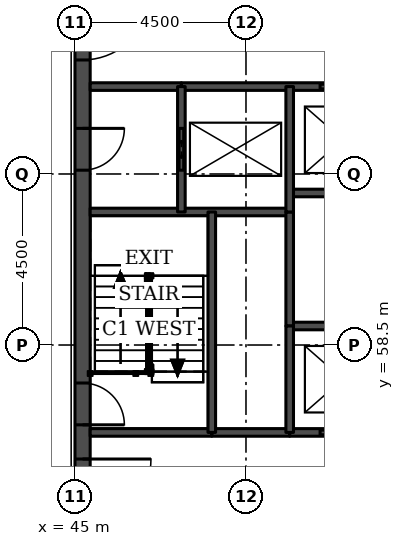
"""IFC4 building model, lengths in metres.
Left out: names, types, materials, properties, quantities, classifications, styles, units other than length and angle.
Written with IfcOpenShell. Run it as: python <this file> out.ifc"""

import sys

from ifc_helpers import new_model, si_unit, direction, frame, frame_2d, origin, place, context, subcontext, project, spatial, rectangle, extrude, element, fill, save


model = new_model("IFC4")
c1 = context("Model", 3, precision=1e-05, world=origin(), true_north=direction((0.0, 1.0)))
c2 = subcontext(c1, "Body", "Model", "MODEL_VIEW")
j1 = project(units=[si_unit("LENGTHUNIT", "METRE"), si_unit("PLANEANGLEUNIT", "RADIAN")], contexts=[c1])
p1 = place(None, origin())
s1 = spatial("IfcSite", under=j1, at=p1, CompositionType="ELEMENT")
p2 = place(p1, origin())
s2 = spatial("IfcBuilding", under=s1, at=p2, CompositionType="ELEMENT")
p3 = place(p2, frame((0.0, 0.0, 206.9)))
s3 = spatial("IfcBuildingStorey", under=s2, at=p3, CompositionType="ELEMENT", Elevation=206.9)
p4 = place(p3, frame((45.2, 49.5, 0.0), z_axis=(0.0, 0.0, 1.0), x_axis=(0.0, 1.0, 0.0)))
e1 = element("IfcWall", 1, at=p4, inside=s3, PredefinedType="SHEAR", context=c2, shape_type="SweptSolid", body=[
    extrude(rectangle(XDim=22.5, YDim=0.4, at=frame_2d((11.25, 0.0))), origin(), (0.0, 0.0, 1.0), 5.0),
])
p5 = place(p4, frame((4.2, 0.0, 0.0)))
e2 = element("IfcOpeningElement", 2, at=p5, cuts=e1, PredefinedType="OPENING", context=c2, shape_type="SweptSolid", body=[
    extrude(rectangle(XDim=1.8, YDim=2.1, at=frame_2d((0.9, 1.05))), frame((0.0, 0.21, 0.0), z_axis=(0.0, -1.0, 0.0), x_axis=(1.0, 0.0, 0.0)), (0.0, 0.0, 1.0), 0.42),
])
p6 = place(p4, frame((6.9, 0.0, 0.0)))
e3 = element("IfcOpeningElement", 3, at=p6, cuts=e1, PredefinedType="OPENING", context=c2, shape_type="SweptSolid", body=[
    extrude(rectangle(XDim=1.1, YDim=2.1, at=frame_2d((0.55, 1.05))), frame((0.0, 0.21, 0.0), z_axis=(0.0, -1.0, 0.0), x_axis=(1.0, 0.0, 0.0)), (0.0, 0.0, 1.0), 0.42),
])
p7 = place(p4, frame((13.6, 0.0, 0.0)))
e4 = element("IfcOpeningElement", 4, at=p7, cuts=e1, PredefinedType="OPENING", context=c2, shape_type="SweptSolid", body=[
    extrude(rectangle(XDim=1.1, YDim=2.1, at=frame_2d((0.55, 1.05))), frame((0.0, 0.21, 0.0), z_axis=(0.0, -1.0, 0.0), x_axis=(1.0, 0.0, 0.0)), (0.0, 0.0, 1.0), 0.42),
])
p8 = place(p4, frame((16.5, 0.0, 0.0)))
e5 = element("IfcOpeningElement", 5, at=p8, cuts=e1, PredefinedType="OPENING", context=c2, shape_type="SweptSolid", body=[
    extrude(rectangle(XDim=1.8, YDim=2.1, at=frame_2d((0.9, 1.05))), frame((0.0, 0.21, 0.0), z_axis=(0.0, -1.0, 0.0), x_axis=(1.0, 0.0, 0.0)), (0.0, 0.0, 1.0), 0.42),
])
p9 = place(p3, frame((48.6, 56.2, 0.0), z_axis=(0.0, 0.0, 1.0), x_axis=(1.0, 0.0, 0.0)))
e6 = element("IfcWall", 6, at=p9, inside=s3, PredefinedType="SOLIDWALL", context=c2, shape_type="SweptSolid", body=[
    extrude(rectangle(XDim=2.05, YDim=0.2, at=frame_2d((1.025, 0.0))), origin(), (0.0, 0.0, 1.0), 4.85),
])
p10 = place(p3, frame((45.4, 56.2, 0.0), z_axis=(0.0, 0.0, 1.0), x_axis=(1.0, 0.0, 0.0)))
e7 = element("IfcWall", 7, at=p10, inside=s3, PredefinedType="SOLIDWALL", context=c2, shape_type="SweptSolid", body=[
    extrude(rectangle(XDim=3.2, YDim=0.2, at=frame_2d((1.6, 0.0))), origin(), (0.0, 0.0, 1.0), 4.85),
])
p11 = place(p3, frame((50.65, 56.2, 0.0), z_axis=(0.0, 0.0, 1.0), x_axis=(1.0, 0.0, 0.0)))
e8 = element("IfcWall", 8, at=p11, inside=s3, PredefinedType="SOLIDWALL", context=c2, shape_type="SweptSolid", body=[
    extrude(rectangle(XDim=11.2, YDim=0.2, at=frame_2d((5.6, 0.0))), origin(), (0.0, 0.0, 1.0), 4.85),
])
p12 = place(p11, frame((0.8, 0.0, 0.0)))
e9 = element("IfcOpeningElement", 9, at=p12, cuts=e8, PredefinedType="OPENING", context=c2, shape_type="SweptSolid", body=[
    extrude(rectangle(XDim=1.2, YDim=2.1, at=frame_2d((0.6, 1.05))), frame((0.0, 0.11, 0.0), z_axis=(0.0, -1.0, 0.0), x_axis=(1.0, 0.0, 0.0)), (0.0, 0.0, 1.0), 0.22),
])
p13 = place(p11, frame((3.6, 0.0, 0.0)))
e10 = element("IfcOpeningElement", 10, at=p13, cuts=e8, PredefinedType="OPENING", context=c2, shape_type="SweptSolid", body=[
    extrude(rectangle(XDim=1.2, YDim=2.1, at=frame_2d((0.6, 1.05))), frame((0.0, 0.11, 0.0), z_axis=(0.0, -1.0, 0.0), x_axis=(1.0, 0.0, 0.0)), (0.0, 0.0, 1.0), 0.22),
])
p14 = place(p11, frame((6.4, 0.0, 0.0)))
e11 = element("IfcOpeningElement", 11, at=p14, cuts=e8, PredefinedType="OPENING", context=c2, shape_type="SweptSolid", body=[
    extrude(rectangle(XDim=1.2, YDim=2.1, at=frame_2d((0.6, 1.05))), frame((0.0, 0.11, 0.0), z_axis=(0.0, -1.0, 0.0), x_axis=(1.0, 0.0, 0.0)), (0.0, 0.0, 1.0), 0.22),
])
p15 = place(p11, frame((9.2, 0.0, 0.0)))
e12 = element("IfcOpeningElement", 12, at=p15, cuts=e8, PredefinedType="OPENING", context=c2, shape_type="SweptSolid", body=[
    extrude(rectangle(XDim=1.2, YDim=2.1, at=frame_2d((0.6, 1.05))), frame((0.0, 0.11, 0.0), z_axis=(0.0, -1.0, 0.0), x_axis=(1.0, 0.0, 0.0)), (0.0, 0.0, 1.0), 0.22),
])
p16 = place(p3, frame((50.65, 59.0, 0.0), z_axis=(0.0, 0.0, 1.0), x_axis=(1.0, 0.0, 0.0)))
e13 = element("IfcWall", 13, at=p16, inside=s3, PredefinedType="SOLIDWALL", context=c2, shape_type="SweptSolid", body=[
    extrude(rectangle(XDim=11.2, YDim=0.2, at=frame_2d((5.6, 0.0))), origin(), (0.0, 0.0, 1.0), 5.0),
])
p17 = place(p3, frame((45.4, 62.0, 0.0), z_axis=(0.0, 0.0, 1.0), x_axis=(1.0, 0.0, 0.0)))
e14 = element("IfcWall", 14, at=p17, inside=s3, PredefinedType="SOLIDWALL", context=c2, shape_type="SweptSolid", body=[
    extrude(rectangle(XDim=5.25, YDim=0.2, at=frame_2d((2.625, 0.0))), origin(), (0.0, 0.0, 1.0), 4.85),
])
p18 = place(p3, frame((50.65, 62.5, 0.0), z_axis=(0.0, 0.0, 1.0), x_axis=(1.0, 0.0, 0.0)))
e15 = element("IfcWall", 15, at=p18, inside=s3, PredefinedType="SOLIDWALL", context=c2, shape_type="SweptSolid", body=[
    extrude(rectangle(XDim=11.2, YDim=0.2, at=frame_2d((5.6, 0.0))), origin(), (0.0, 0.0, 1.0), 5.0),
])
p19 = place(p3, frame((45.4, 65.3, 0.0), z_axis=(0.0, 0.0, 1.0), x_axis=(1.0, 0.0, 0.0)))
e16 = element("IfcWall", 16, at=p19, inside=s3, PredefinedType="SOLIDWALL", context=c2, shape_type="SweptSolid", body=[
    extrude(rectangle(XDim=2.4, YDim=0.2, at=frame_2d((1.2, 0.0))), origin(), (0.0, 0.0, 1.0), 4.85),
])
p20 = place(p3, frame((47.8, 65.3, 0.0), z_axis=(0.0, 0.0, 1.0), x_axis=(1.0, 0.0, 0.0)))
e17 = element("IfcWall", 17, at=p20, inside=s3, PredefinedType="SOLIDWALL", context=c2, shape_type="SweptSolid", body=[
    extrude(rectangle(XDim=16.9, YDim=0.2, at=frame_2d((8.45, 0.0))), origin(), (0.0, 0.0, 1.0), 4.85),
])
p21 = place(p20, frame((3.65, 0.0, 0.0)))
e18 = element("IfcOpeningElement", 18, at=p21, cuts=e17, PredefinedType="OPENING", context=c2, shape_type="SweptSolid", body=[
    extrude(rectangle(XDim=1.2, YDim=2.1, at=frame_2d((0.6, 1.05))), frame((0.0, 0.11, 0.0), z_axis=(0.0, -1.0, 0.0), x_axis=(1.0, 0.0, 0.0)), (0.0, 0.0, 1.0), 0.22),
])
p22 = place(p20, frame((6.45, 0.0, 0.0)))
e19 = element("IfcOpeningElement", 19, at=p22, cuts=e17, PredefinedType="OPENING", context=c2, shape_type="SweptSolid", body=[
    extrude(rectangle(XDim=1.2, YDim=2.1, at=frame_2d((0.6, 1.05))), frame((0.0, 0.11, 0.0), z_axis=(0.0, -1.0, 0.0), x_axis=(1.0, 0.0, 0.0)), (0.0, 0.0, 1.0), 0.22),
])
p23 = place(p20, frame((9.25, 0.0, 0.0)))
e20 = element("IfcOpeningElement", 20, at=p23, cuts=e17, PredefinedType="OPENING", context=c2, shape_type="SweptSolid", body=[
    extrude(rectangle(XDim=1.2, YDim=2.1, at=frame_2d((0.6, 1.05))), frame((0.0, 0.11, 0.0), z_axis=(0.0, -1.0, 0.0), x_axis=(1.0, 0.0, 0.0)), (0.0, 0.0, 1.0), 0.22),
])
p24 = place(p20, frame((12.05, 0.0, 0.0)))
e21 = element("IfcOpeningElement", 21, at=p24, cuts=e17, PredefinedType="OPENING", context=c2, shape_type="SweptSolid", body=[
    extrude(rectangle(XDim=1.2, YDim=2.1, at=frame_2d((0.6, 1.05))), frame((0.0, 0.11, 0.0), z_axis=(0.0, -1.0, 0.0), x_axis=(1.0, 0.0, 0.0)), (0.0, 0.0, 1.0), 0.22),
])
p25 = place(p3, frame((47.8, 62.0, 0.0), z_axis=(0.0, 0.0, 1.0), x_axis=(0.0, 1.0, 0.0)))
e22 = element("IfcWall", 22, at=p25, inside=s3, PredefinedType="SOLIDWALL", context=c2, shape_type="SweptSolid", body=[
    extrude(rectangle(XDim=3.3, YDim=0.2, at=frame_2d((1.65, 0.0))), origin(), (0.0, 0.0, 1.0), 4.85),
])
p26 = place(p25, frame((1.1, 0.0, 0.0)))
e23 = element("IfcOpeningElement", 23, at=p26, cuts=e22, PredefinedType="OPENING", context=c2, shape_type="SweptSolid", body=[
    extrude(rectangle(XDim=1.1, YDim=2.1, at=frame_2d((0.55, 1.05))), frame((0.0, 0.11, 0.0), z_axis=(0.0, -1.0, 0.0), x_axis=(1.0, 0.0, 0.0)), (0.0, 0.0, 1.0), 0.22),
])
p27 = place(p3, frame((48.6, 56.2, 0.0), z_axis=(0.0, 0.0, 1.0), x_axis=(0.0, 1.0, 0.0)))
e24 = element("IfcWall", 24, at=p27, inside=s3, PredefinedType="SOLIDWALL", context=c2, shape_type="SweptSolid", body=[
    extrude(rectangle(XDim=5.8, YDim=0.2, at=frame_2d((2.9, 0.0))), origin(), (0.0, 0.0, 1.0), 4.85),
])
p28 = place(p3, frame((50.65, 59.0, 0.0), z_axis=(0.0, 0.0, 1.0), x_axis=(0.0, 1.0, 0.0)))
e25 = element("IfcWall", 25, at=p28, inside=s3, PredefinedType="SOLIDWALL", context=c2, shape_type="SweptSolid", body=[
    extrude(rectangle(XDim=3.0, YDim=0.2, at=frame_2d((1.5, 0.0))), origin(), (0.0, 0.0, 1.0), 5.0),
])
p29 = place(p3, frame((50.65, 56.2, 0.0), z_axis=(0.0, 0.0, 1.0), x_axis=(0.0, 1.0, 0.0)))
e26 = element("IfcWall", 26, at=p29, inside=s3, PredefinedType="SOLIDWALL", context=c2, shape_type="SweptSolid", body=[
    extrude(rectangle(XDim=2.8, YDim=0.2, at=frame_2d((1.4, 0.0))), origin(), (0.0, 0.0, 1.0), 4.85),
])
p30 = place(p3, frame((50.65, 62.0, 0.0), z_axis=(0.0, 0.0, 1.0), x_axis=(0.0, 1.0, 0.0)))
e27 = element("IfcWall", 27, at=p30, inside=s3, PredefinedType="SOLIDWALL", context=c2, shape_type="SweptSolid", body=[
    extrude(rectangle(XDim=3.3, YDim=0.2, at=frame_2d((1.65, 0.0))), origin(), (0.0, 0.0, 1.0), 4.85),
])
p31 = place(p12, origin())
e28 = element("IfcDoor", 28, at=p31, inside=s3, OperationType="DOUBLE_DOOR_SLIDING", PredefinedType="DOOR", context=c2, shape_type="SweptSolid", body=[
    extrude(rectangle(XDim=1.2, YDim=2.1, at=frame_2d((0.6, 1.05))), frame((0.0, 0.025, 0.0), z_axis=(0.0, -1.0, 0.0), x_axis=(1.0, 0.0, 0.0)), (0.0, 0.0, 1.0), 0.05),
])
fill(e9, e28)
p32 = place(p21, origin())
e29 = element("IfcDoor", 29, at=p32, inside=s3, OperationType="DOUBLE_DOOR_SLIDING", PredefinedType="DOOR", context=c2, shape_type="SweptSolid", body=[
    extrude(rectangle(XDim=1.2, YDim=2.1, at=frame_2d((0.6, 1.05))), frame((0.0, 0.025, 0.0), z_axis=(0.0, -1.0, 0.0), x_axis=(1.0, 0.0, 0.0)), (0.0, 0.0, 1.0), 0.05),
])
fill(e18, e29)
p33 = place(p26, origin())
e30 = element("IfcDoor", 30, at=p33, inside=s3, OperationType="DOUBLE_DOOR_SLIDING", PredefinedType="DOOR", context=c2, shape_type="SweptSolid", body=[
    extrude(rectangle(XDim=1.1, YDim=2.1, at=frame_2d((0.55, 1.05))), frame((0.0, 0.025, 0.0), z_axis=(0.0, -1.0, 0.0), x_axis=(1.0, 0.0, 0.0)), (0.0, 0.0, 1.0), 0.05),
])
fill(e23, e30)
p34 = place(p5, frame((1.8, 0.0, 0.0), z_axis=(0.0, 0.0, 1.0), x_axis=(-1.0, 0.0, 0.0)))
e31 = element("IfcDoor", 31, at=p34, inside=s3, OperationType="SINGLE_SWING_LEFT", PredefinedType="DOOR", context=c2, shape_type="SweptSolid", body=[
    extrude(rectangle(XDim=1.8, YDim=2.1, at=frame_2d((0.9, 1.05))), frame((0.0, 0.025, 0.0), z_axis=(0.0, -1.0, 0.0), x_axis=(1.0, 0.0, 0.0)), (0.0, 0.0, 1.0), 0.05),
])
fill(e2, e31)
p35 = place(p6, frame((1.1, 0.0, 0.0), z_axis=(0.0, 0.0, 1.0), x_axis=(-1.0, 0.0, 0.0)))
e32 = element("IfcDoor", 32, at=p35, inside=s3, OperationType="SINGLE_SWING_RIGHT", PredefinedType="DOOR", context=c2, shape_type="SweptSolid", body=[
    extrude(rectangle(XDim=1.1, YDim=2.1, at=frame_2d((0.55, 1.05))), frame((0.0, 0.025, 0.0), z_axis=(0.0, -1.0, 0.0), x_axis=(1.0, 0.0, 0.0)), (0.0, 0.0, 1.0), 0.05),
])
fill(e3, e32)
p36 = place(p7, frame((1.1, 0.0, 0.0), z_axis=(0.0, 0.0, 1.0), x_axis=(-1.0, 0.0, 0.0)))
e33 = element("IfcDoor", 33, at=p36, inside=s3, OperationType="SINGLE_SWING_LEFT", PredefinedType="DOOR", context=c2, shape_type="SweptSolid", body=[
    extrude(rectangle(XDim=1.1, YDim=2.1, at=frame_2d((0.55, 1.05))), frame((0.0, 0.025, 0.0), z_axis=(0.0, -1.0, 0.0), x_axis=(1.0, 0.0, 0.0)), (0.0, 0.0, 1.0), 0.05),
])
fill(e4, e33)
p37 = place(p8, frame((1.8, 0.0, 0.0), z_axis=(0.0, 0.0, 1.0), x_axis=(-1.0, 0.0, 0.0)))
e34 = element("IfcDoor", 34, at=p37, inside=s3, OperationType="SINGLE_SWING_LEFT", PredefinedType="DOOR", context=c2, shape_type="SweptSolid", body=[
    extrude(rectangle(XDim=1.8, YDim=2.1, at=frame_2d((0.9, 1.05))), frame((0.0, 0.025, 0.0), z_axis=(0.0, -1.0, 0.0), x_axis=(1.0, 0.0, 0.0)), (0.0, 0.0, 1.0), 0.05),
])
fill(e5, e34)
save(model, sys.argv[1])
